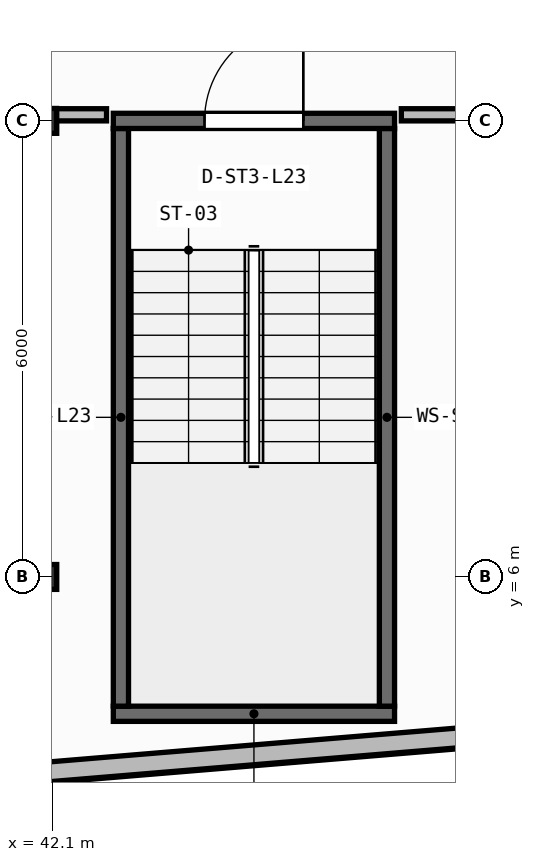
"""IFC4 building model, lengths in metres.
Left out: names, types, materials, properties, quantities, classifications, styles, units other than length and angle.
Written with IfcOpenShell. Run it as: python <this file> out.ifc"""

import sys

from ifc_helpers import new_model, si_unit, direction, frame, frame_2d, origin, origin_2d, place, context, subcontext, project, spatial, rectangle, i_section, extrude, element, fill, save


model = new_model("IFC4")
c1 = context("Model", 3, precision=1e-05, world=origin(), true_north=direction((0.0, 1.0)))
c2 = subcontext(c1, "Body", "Model", "MODEL_VIEW")
j1 = project(units=[si_unit("LENGTHUNIT", "METRE"), si_unit("PLANEANGLEUNIT", "RADIAN")], contexts=[c1])
p1 = place(None, origin())
s1 = spatial("IfcSite", under=j1, at=p1, CompositionType="ELEMENT")
p2 = place(p1, origin())
s2 = spatial("IfcBuilding", under=s1, at=p2, CompositionType="ELEMENT")
p3 = place(p2, frame((0.0, 0.0, 93.6)))
s3 = spatial("IfcBuildingStorey", under=s2, at=p3, CompositionType="ELEMENT", Elevation=93.6)
for number, where, z_axis, x_axis in (
    (1, (42.0, 6.0, 0.0), (0.0, 0.0, 1.0), (1.0, 0.0, 0.0)),
    (2, (42.0, 12.0, 0.0), (0.0, 0.0, 1.0), (1.0, 0.0, 0.0)),
):
    element("IfcColumn", number, at=place(p3, frame(where, z_axis=z_axis, x_axis=x_axis)), inside=s3, PredefinedType="COLUMN", context=c2, shape_type="SweptSolid", body=[
        extrude(i_section(OverallWidth=0.311, OverallDepth=0.327, WebThickness=0.016, FlangeThickness=0.025, FilletRadius=0.017, at=origin_2d()), origin(), (0.0, 0.0, 1.0), 3.95),
    ])
p4 = place(p3, frame((2.76, 0.174, 0.0), z_axis=(0.0, 0.0, 1.0), x_axis=(0.996571478456, 0.082736257641, 0.0)))
e3 = element("IfcWall", 3, at=p4, inside=s3, PredefinedType="STANDARD", context=c2, shape_type="SweptSolid", body=[
    extrude(rectangle(XDim=52.861, YDim=0.26, at=frame_2d((26.431, 0.0))), origin(), (0.0, 0.0, 1.0), 3.67),
])
p5 = place(p4, frame((25.231, 0.0, 0.9)))
e4 = element("IfcOpeningElement", 4, at=p5, cuts=e3, PredefinedType="OPENING", context=c2, shape_type="SweptSolid", body=[
    extrude(rectangle(XDim=2.4, YDim=1.65, at=frame_2d((1.2, 0.825))), frame((0.0, 0.14, 0.0), z_axis=(0.0, -1.0, 0.0), x_axis=(1.0, 0.0, 0.0)), (0.0, 0.0, 1.0), 0.28),
])
p6 = place(p3, frame((42.9, 4.2, 0.0), z_axis=(0.0, 0.0, 1.0), x_axis=(1.0, 0.0, 0.0)))
e5 = element("IfcWall", 5, at=p6, inside=s3, PredefinedType="SHEAR", context=c2, shape_type="SweptSolid", body=[
    extrude(rectangle(XDim=3.7, YDim=0.2, at=frame_2d((1.85, 0.0))), origin(), (0.0, 0.0, 1.0), 3.67),
])
for number, where, z_axis, x_axis in (
    (6, (43.0, 4.3, 0.0), (0.0, 0.0, 1.0), (0.0, 1.0, 0.0)),
    (7, (46.5, 4.3, 0.0), (0.0, 0.0, 1.0), (0.0, 1.0, 0.0)),
):
    element("IfcWall", number, at=place(p3, frame(where, z_axis=z_axis, x_axis=x_axis)), inside=s3, PredefinedType="SHEAR", context=c2, shape_type="SweptSolid", body=[
        extrude(rectangle(XDim=7.6, YDim=0.2, at=frame_2d((3.8, 0.0))), origin(), (0.0, 0.0, 1.0), 3.67),
    ])
p7 = place(p3, frame((42.9, 12.0, 0.0), z_axis=(0.0, 0.0, 1.0), x_axis=(1.0, 0.0, 0.0)))
e8 = element("IfcWall", 8, at=p7, inside=s3, PredefinedType="SHEAR", context=c2, shape_type="SweptSolid", body=[
    extrude(rectangle(XDim=3.7, YDim=0.2, at=frame_2d((1.85, 0.0))), origin(), (0.0, 0.0, 1.0), 3.67),
])
p8 = place(p7, frame((1.2, 0.0, 0.0)))
e9 = element("IfcOpeningElement", 9, at=p8, cuts=e8, PredefinedType="OPENING", context=c2, shape_type="SweptSolid", body=[
    extrude(rectangle(XDim=1.3, YDim=2.15, at=frame_2d((0.65, 1.075))), frame((0.0, 0.11, 0.0), z_axis=(0.0, -1.0, 0.0), x_axis=(1.0, 0.0, 0.0)), (0.0, 0.0, 1.0), 0.22),
])
p9 = place(p3, frame((31.63, 12.08, 0.0), z_axis=(0.0, 0.0, 1.0), x_axis=(1.0, 0.0, 0.0)))
e10 = element("IfcWall", 10, at=p9, inside=s3, PredefinedType="PARTITIONING", context=c2, shape_type="SweptSolid", body=[
    extrude(rectangle(XDim=11.181, YDim=0.16, at=frame_2d((5.59, 0.0))), origin(), (0.0, 0.0, 1.0), 3.033),
])
p10 = place(p3, frame((46.689, 12.08, 0.0), z_axis=(0.0, 0.0, 1.0), x_axis=(1.0, 0.0, 0.0)))
e11 = element("IfcWall", 11, at=p10, inside=s3, PredefinedType="PARTITIONING", context=c2, shape_type="SweptSolid", body=[
    extrude(rectangle(XDim=3.011, YDim=0.16, at=frame_2d((1.505, 0.0))), origin(), (0.0, 0.0, 1.0), 3.033),
])
p11 = place(p8, origin())
e12 = element("IfcDoor", 12, at=p11, inside=s3, OperationType="SINGLE_SWING_RIGHT", PredefinedType="DOOR", context=c2, shape_type="SweptSolid", body=[
    extrude(rectangle(XDim=1.3, YDim=2.15, at=frame_2d((0.65, 1.075))), frame((0.0, 0.025, 0.0), z_axis=(0.0, -1.0, 0.0), x_axis=(1.0, 0.0, 0.0)), (0.0, 0.0, 1.0), 0.05),
])
fill(e9, e12)
save(model, sys.argv[1])
